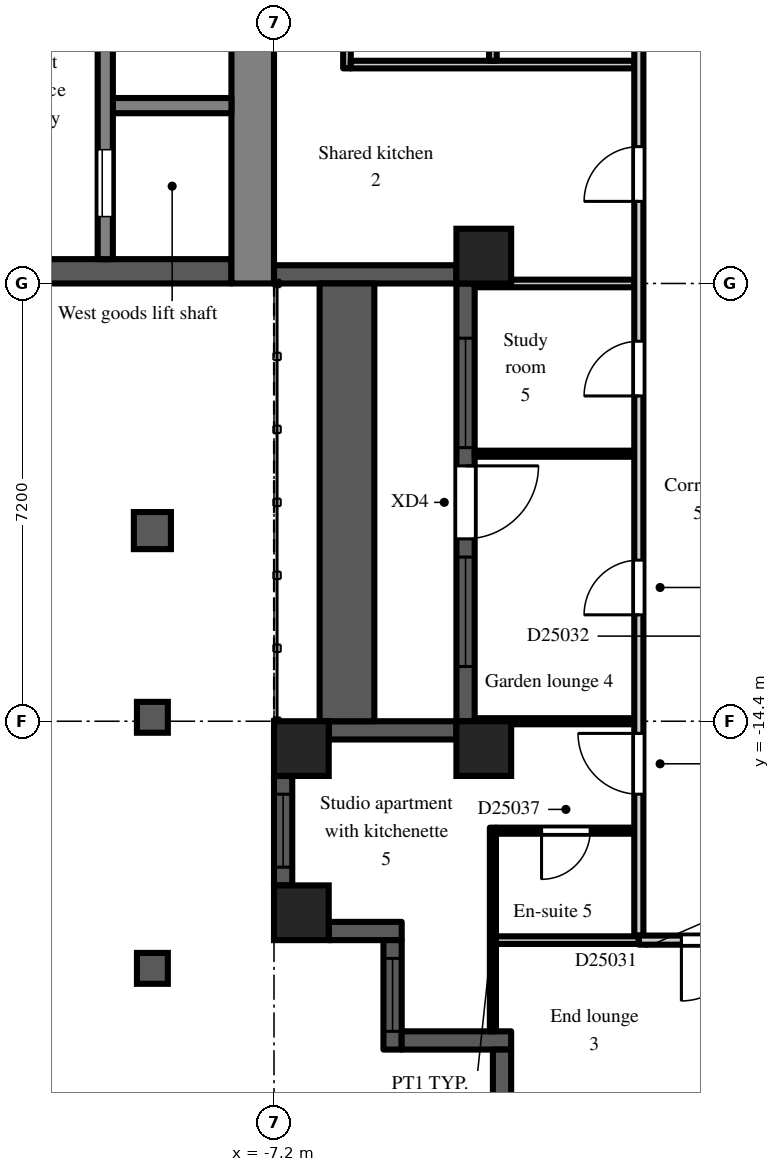
"""IFC4 building model, lengths in metres.
Left out: names, types, materials, properties, quantities, classifications, styles, units other than length and angle.
Written with IfcOpenShell. Run it as: python <this file> out.ifc"""

import sys

from ifc_helpers import new_model, si_unit, direction, frame, frame_2d, origin, origin_2d, place, context, subcontext, project, spatial, rectangle, extrude, element, fill, save


model = new_model("IFC4")
c1 = context("Model", 3, precision=1e-05, world=origin(), true_north=direction((0.0, 1.0)))
c2 = subcontext(c1, "Body", "Model", "MODEL_VIEW")
j1 = project(units=[si_unit("LENGTHUNIT", "METRE"), si_unit("PLANEANGLEUNIT", "RADIAN")], contexts=[c1])
p1 = place(None, origin())
s1 = spatial("IfcSite", under=j1, at=p1, CompositionType="ELEMENT")
p2 = place(p1, origin())
s2 = spatial("IfcBuilding", under=s1, at=p2, CompositionType="ELEMENT")
p3 = place(p2, frame((0.0, 0.0, 170.7)))
s3 = spatial("IfcBuildingStorey", under=s2, at=p3, CompositionType="ELEMENT", Elevation=170.7)
for number, where, z_axis, x_axis in (
    (1, (-6.75, -17.55, 0.0), (0.0, 0.0, 1.0), (1.0, 0.0, 0.0)),
    (2, (-6.75, -14.85, 0.0), (0.0, 0.0, 1.0), (1.0, 0.0, 0.0)),
    (3, (-3.75, -14.85, 0.0), (0.0, 0.0, 1.0), (1.0, 0.0, 0.0)),
    (4, (-3.75, -6.75, 0.0), (0.0, 0.0, 1.0), (1.0, 0.0, 0.0)),
):
    element("IfcColumn", number, at=place(p3, frame(where, z_axis=z_axis, x_axis=x_axis)), inside=s3, PredefinedType="COLUMN", context=c2, shape_type="SweptSolid", body=[
        extrude(rectangle(XDim=0.9, YDim=0.9, at=origin_2d()), origin(), (0.0, 0.0, 1.0), 3.0),
    ])
p4 = place(p3, frame((-7.2, -7.05, 0.0), z_axis=(0.0, 0.0, 1.0), x_axis=(1.0, 0.0, 0.0)))
e5 = element("IfcWall", 5, at=p4, inside=s3, PredefinedType="SOLIDWALL", context=c2, shape_type="SweptSolid", body=[
    extrude(rectangle(XDim=3.0, YDim=0.3, at=frame_2d((1.5, 0.0))), origin(), (0.0, 0.0, 1.0), 2.2),
])
p5 = place(p3, frame((-4.05, -7.2, 0.0), z_axis=(0.0, 0.0, 1.0), x_axis=(0.0, -1.0, 0.0)))
e6 = element("IfcWall", 6, at=p5, inside=s3, PredefinedType="SOLIDWALL", context=c2, shape_type="SweptSolid", body=[
    extrude(rectangle(XDim=7.2, YDim=0.3, at=frame_2d((3.6, 0.0))), origin(), (0.0, 0.0, 1.0), 2.2),
])
p6 = place(p5, frame((3.0, 0.0, 0.0)))
e7 = element("IfcOpeningElement", 7, at=p6, cuts=e6, PredefinedType="OPENING", context=c2, shape_type="SweptSolid", body=[
    extrude(rectangle(XDim=1.2, YDim=2.05, at=frame_2d((0.6, 1.025))), frame((0.0, 0.16, 0.0), z_axis=(0.0, -1.0, 0.0), x_axis=(1.0, 0.0, 0.0)), (0.0, 0.0, 1.0), 0.32),
])
p7 = place(p5, frame((0.9, 0.0, 0.2)))
e8 = element("IfcOpeningElement", 8, at=p7, cuts=e6, PredefinedType="OPENING", context=c2, shape_type="SweptSolid", body=[
    extrude(rectangle(XDim=1.8, YDim=1.85, at=frame_2d((0.9, 0.925))), frame((0.0, 0.16, 0.0), z_axis=(0.0, -1.0, 0.0), x_axis=(1.0, 0.0, 0.0)), (0.0, 0.0, 1.0), 0.32),
])
p8 = place(p5, frame((4.5, 0.0, 0.2)))
e9 = element("IfcOpeningElement", 9, at=p8, cuts=e6, PredefinedType="OPENING", context=c2, shape_type="SweptSolid", body=[
    extrude(rectangle(XDim=1.8, YDim=1.85, at=frame_2d((0.9, 0.925))), frame((0.0, 0.16, 0.0), z_axis=(0.0, -1.0, 0.0), x_axis=(1.0, 0.0, 0.0)), (0.0, 0.0, 1.0), 0.32),
])
p9 = place(p3, frame((-4.2, -14.55, 0.0), z_axis=(0.0, 0.0, 1.0), x_axis=(-1.0, 0.0, 0.0)))
e10 = element("IfcWall", 10, at=p9, inside=s3, PredefinedType="SOLIDWALL", context=c2, shape_type="SweptSolid", body=[
    extrude(rectangle(XDim=2.1, YDim=0.3, at=frame_2d((1.05, 0.0))), origin(), (0.0, 0.0, 1.0), 2.2),
])
p10 = place(p3, frame((-7.05, -15.3, 0.0), z_axis=(0.0, 0.0, 1.0), x_axis=(0.0, -1.0, 0.0)))
e11 = element("IfcWall", 11, at=p10, inside=s3, PredefinedType="SOLIDWALL", context=c2, shape_type="SweptSolid", body=[
    extrude(rectangle(XDim=1.8, YDim=0.3, at=frame_2d((0.9, 0.0))), origin(), (0.0, 0.0, 1.0), 2.2),
])
p11 = place(p10, frame((0.3, 0.0, 0.2)))
e12 = element("IfcOpeningElement", 12, at=p11, cuts=e11, PredefinedType="OPENING", context=c2, shape_type="SweptSolid", body=[
    extrude(rectangle(XDim=1.2, YDim=1.85, at=frame_2d((0.6, 0.925))), frame((0.0, 0.16, 0.0), z_axis=(0.0, -1.0, 0.0), x_axis=(1.0, 0.0, 0.0)), (0.0, 0.0, 1.0), 0.32),
])
p12 = place(p3, frame((-6.3, -17.85, 0.0), z_axis=(0.0, 0.0, 1.0), x_axis=(1.0, 0.0, 0.0)))
e13 = element("IfcWall", 13, at=p12, inside=s3, PredefinedType="SOLIDWALL", context=c2, shape_type="SweptSolid", body=[
    extrude(rectangle(XDim=1.2, YDim=0.3, at=frame_2d((0.6, 0.0))), origin(), (0.0, 0.0, 1.0), 2.6),
])
p13 = place(p3, frame((-5.25, -18.0, 0.0), z_axis=(0.0, 0.0, 1.0), x_axis=(0.0, -1.0, 0.0)))
e14 = element("IfcWall", 14, at=p13, inside=s3, PredefinedType="SOLIDWALL", context=c2, shape_type="SweptSolid", body=[
    extrude(rectangle(XDim=1.8, YDim=0.3, at=frame_2d((0.9, 0.0))), origin(), (0.0, 0.0, 1.0), 2.6),
])
p14 = place(p13, frame((0.3, 0.0, 0.2)))
e15 = element("IfcOpeningElement", 15, at=p14, cuts=e14, PredefinedType="OPENING", context=c2, shape_type="SweptSolid", body=[
    extrude(rectangle(XDim=1.2, YDim=1.85, at=frame_2d((0.6, 0.925))), frame((0.0, 0.16, 0.0), z_axis=(0.0, -1.0, 0.0), x_axis=(1.0, 0.0, 0.0)), (0.0, 0.0, 1.0), 0.32),
])
p15 = place(p3, frame((-5.1, -19.65, 0.0), z_axis=(0.0, 0.0, 1.0), x_axis=(1.0, 0.0, 0.0)))
e16 = element("IfcWall", 16, at=p15, inside=s3, PredefinedType="SOLIDWALL", context=c2, shape_type="SweptSolid", body=[
    extrude(rectangle(XDim=1.8, YDim=0.3, at=frame_2d((0.9, 0.0))), origin(), (0.0, 0.0, 1.0), 2.6),
])
p16 = place(p3, frame((-3.45, -19.8, 0.0), z_axis=(0.0, 0.0, 1.0), x_axis=(0.0, -1.0, 0.0)))
e17 = element("IfcWall", 17, at=p16, inside=s3, PredefinedType="SOLIDWALL", context=c2, shape_type="SweptSolid", body=[
    extrude(rectangle(XDim=0.9, YDim=0.3, at=frame_2d((0.45, 0.0))), origin(), (0.0, 0.0, 1.0), 2.6),
])
p17 = place(p3, frame((-6.0, -14.4, 0.0), z_axis=(0.0, 0.0, 1.0), x_axis=(0.0, 1.0, 0.0)))
e18 = element("IfcWall", 18, at=p17, inside=s3, PredefinedType="PARAPET", context=c2, shape_type="SweptSolid", body=[
    extrude(rectangle(XDim=7.2, YDim=0.9, at=frame_2d((3.6, 0.0))), origin(), (0.0, 0.0, 1.0), 0.8),
])
p18 = place(p3, frame((-7.55, -7.2, 0.0), z_axis=(0.0, 0.0, 1.0), x_axis=(0.0, 1.0, 0.0)))
e19 = element("IfcWall", 19, at=p18, inside=s3, PredefinedType="SHEAR", context=c2, shape_type="SweptSolid", body=[
    extrude(rectangle(XDim=14.4, YDim=0.7, at=frame_2d((7.2, 0.0))), origin(), (0.0, 0.0, 1.0), 2.6),
])
p19 = place(p18, frame((6.0, 0.0, 0.0)))
e20 = element("IfcOpeningElement", 20, at=p19, cuts=e19, PredefinedType="OPENING", context=c2, shape_type="SweptSolid", body=[
    extrude(rectangle(XDim=2.4, YDim=2.2, at=frame_2d((1.2, 1.1))), frame((0.0, 0.36, 0.0), z_axis=(0.0, -1.0, 0.0), x_axis=(1.0, 0.0, 0.0)), (0.0, 0.0, 1.0), 0.72),
])
p20 = place(p3, frame((-7.9, -7.0, 0.0), z_axis=(0.0, 0.0, 1.0), x_axis=(-1.0, 0.0, 0.0)))
e21 = element("IfcWall", 21, at=p20, inside=s3, PredefinedType="SHEAR", context=c2, shape_type="SweptSolid", body=[
    extrude(rectangle(XDim=12.95, YDim=0.4, at=frame_2d((6.475, 0.0))), origin(), (0.0, 0.0, 1.0), 2.6),
])
p21 = place(p3, frame((-7.9, -4.275, 0.0), z_axis=(0.0, 0.0, 1.0), x_axis=(-1.0, 0.0, 0.0)))
e22 = element("IfcWall", 22, at=p21, inside=s3, PredefinedType="SHEAR", context=c2, shape_type="SweptSolid", body=[
    extrude(rectangle(XDim=1.95, YDim=0.25, at=frame_2d((0.975, 0.0))), origin(), (0.0, 0.0, 1.0), 2.6),
])
p22 = place(p3, frame((-9.975, -2.05, 0.0), z_axis=(0.0, 0.0, 1.0), x_axis=(0.0, -1.0, 0.0)))
e23 = element("IfcWall", 23, at=p22, inside=s3, PredefinedType="SHEAR", context=c2, shape_type="SweptSolid", body=[
    extrude(rectangle(XDim=4.75, YDim=0.25, at=frame_2d((2.375, 0.0))), origin(), (0.0, 0.0, 1.0), 2.6),
])
p23 = place(p22, frame((2.95, 0.0, 0.0)))
e24 = element("IfcOpeningElement", 24, at=p23, cuts=e23, PredefinedType="OPENING", context=c2, shape_type="SweptSolid", body=[
    extrude(rectangle(XDim=1.1, YDim=2.1, at=frame_2d((0.55, 1.05))), frame((0.0, 0.135, 0.0), z_axis=(0.0, -1.0, 0.0), x_axis=(1.0, 0.0, 0.0)), (0.0, 0.0, 1.0), 0.27),
])
p24 = place(p3, frame((-6.0, -3.663, 0.0), z_axis=(0.0, 0.0, 1.0), x_axis=(0.0, 1.0, 0.0)))
e25 = element("IfcWall", 25, at=p24, inside=s3, PredefinedType="PARTITIONING", context=c2, shape_type="SweptSolid", body=[
    extrude(rectangle(XDim=2.388, YDim=0.125, at=frame_2d((1.194, 0.0))), origin(), (0.0, 0.0, 1.0), 2.6),
])
p25 = place(p3, frame((-5.938, -3.6, 0.0), z_axis=(0.0, 0.0, 1.0), x_axis=(1.0, 0.0, 0.0)))
e26 = element("IfcWall", 26, at=p25, inside=s3, PredefinedType="PARTITIONING", context=c2, shape_type="SweptSolid", body=[
    extrude(rectangle(XDim=4.663, YDim=0.125, at=frame_2d((2.331, 0.0))), origin(), (0.0, 0.0, 1.0), 2.6),
])
for number, where, z_axis, x_axis in (
    (27, (-3.9, -14.4, 0.0), (0.0, 0.0, 1.0), (1.0, 0.0, 0.0)),
    (28, (-3.9, -10.0, 0.0), (0.0, 0.0, 1.0), (1.0, 0.0, 0.0)),
):
    element("IfcWall", number, at=place(p3, frame(where, z_axis=z_axis, x_axis=x_axis)), inside=s3, PredefinedType="PARTITIONING", context=c2, shape_type="SweptSolid", body=[
        extrude(rectangle(XDim=2.625, YDim=0.1, at=frame_2d((1.312, 0.0))), origin(), (0.0, 0.0, 1.0), 2.6),
    ])
p26 = place(p3, frame((-3.9, -7.2, 0.0), z_axis=(0.0, 0.0, 1.0), x_axis=(1.0, 0.0, 0.0)))
e29 = element("IfcWall", 29, at=p26, inside=s3, PredefinedType="PARTITIONING", context=c2, shape_type="SweptSolid", body=[
    extrude(rectangle(XDim=2.625, YDim=0.125, at=frame_2d((1.312, 0.0))), origin(), (0.0, 0.0, 1.0), 2.6),
])
p27 = place(p3, frame((-3.6, -19.5, 0.0), z_axis=(0.0, 0.0, 1.0), x_axis=(0.0, 1.0, 0.0)))
e30 = element("IfcWall", 30, at=p27, inside=s3, PredefinedType="PARTITIONING", context=c2, shape_type="SweptSolid", body=[
    extrude(rectangle(XDim=3.35, YDim=0.1, at=frame_2d((1.675, 0.0))), origin(), (0.0, 0.0, 1.0), 2.6),
])
p28 = place(p3, frame((-3.55, -18.0, 0.0), z_axis=(0.0, 0.0, 1.0), x_axis=(1.0, 0.0, 0.0)))
e31 = element("IfcWall", 31, at=p28, inside=s3, PredefinedType="PARTITIONING", context=c2, shape_type="SweptSolid", body=[
    extrude(rectangle(XDim=2.35, YDim=0.125, at=frame_2d((1.175, 0.0))), origin(), (0.0, 0.0, 1.0), 2.6),
])
p29 = place(p3, frame((-3.55, -16.2, 0.0), z_axis=(0.0, 0.0, 1.0), x_axis=(1.0, 0.0, 0.0)))
e32 = element("IfcWall", 32, at=p29, inside=s3, PredefinedType="PARTITIONING", context=c2, shape_type="SweptSolid", body=[
    extrude(rectangle(XDim=2.275, YDim=0.1, at=frame_2d((1.138, 0.0))), origin(), (0.0, 0.0, 1.0), 2.6),
])
p30 = place(p29, frame((0.75, 0.0, 0.0)))
e33 = element("IfcOpeningElement", 33, at=p30, cuts=e32, PredefinedType="OPENING", context=c2, shape_type="SweptSolid", body=[
    extrude(rectangle(XDim=0.8, YDim=2.1, at=frame_2d((0.4, 1.05))), frame((0.0, 0.06, 0.0), z_axis=(0.0, -1.0, 0.0), x_axis=(1.0, 0.0, 0.0)), (0.0, 0.0, 1.0), 0.12),
])
p31 = place(p3, frame((-3.6, -3.538, 0.0), z_axis=(0.0, 0.0, 1.0), x_axis=(0.0, 1.0, 0.0)))
e34 = element("IfcWall", 34, at=p31, inside=s3, PredefinedType="PARTITIONING", context=c2, shape_type="SweptSolid", body=[
    extrude(rectangle(XDim=2.263, YDim=0.125, at=frame_2d((1.131, 0.0))), origin(), (0.0, 0.0, 1.0), 2.6),
])
p32 = place(p3, frame((-1.2, -17.925, 0.0), z_axis=(0.0, 0.0, 1.0), x_axis=(0.0, 1.0, 0.0)))
e35 = element("IfcWall", 35, at=p32, inside=s3, PredefinedType="PARTITIONING", context=c2, shape_type="SweptSolid", body=[
    extrude(rectangle(XDim=16.65, YDim=0.15, at=frame_2d((8.325, 0.0))), origin(), (0.0, 0.0, 1.0), 2.6),
])
p33 = place(p32, frame((15.075, 0.0, 0.0)))
e36 = element("IfcOpeningElement", 36, at=p33, cuts=e35, PredefinedType="OPENING", context=c2, shape_type="SweptSolid", body=[
    extrude(rectangle(XDim=0.9, YDim=2.1, at=frame_2d((0.45, 1.05))), frame((0.0, 0.085, 0.0), z_axis=(0.0, -1.0, 0.0), x_axis=(1.0, 0.0, 0.0)), (0.0, 0.0, 1.0), 0.17),
])
p34 = place(p32, frame((12.075, 0.0, 0.0)))
e37 = element("IfcOpeningElement", 37, at=p34, cuts=e35, PredefinedType="OPENING", context=c2, shape_type="SweptSolid", body=[
    extrude(rectangle(XDim=0.9, YDim=2.1, at=frame_2d((0.45, 1.05))), frame((0.0, 0.085, 0.0), z_axis=(0.0, -1.0, 0.0), x_axis=(1.0, 0.0, 0.0)), (0.0, 0.0, 1.0), 0.17),
])
p35 = place(p32, frame((8.875, 0.0, 0.0)))
e38 = element("IfcOpeningElement", 38, at=p35, cuts=e35, PredefinedType="OPENING", context=c2, shape_type="SweptSolid", body=[
    extrude(rectangle(XDim=0.9, YDim=2.1, at=frame_2d((0.45, 1.05))), frame((0.0, 0.085, 0.0), z_axis=(0.0, -1.0, 0.0), x_axis=(1.0, 0.0, 0.0)), (0.0, 0.0, 1.0), 0.17),
])
p36 = place(p32, frame((5.275, 0.0, 0.0)))
e39 = element("IfcOpeningElement", 39, at=p36, cuts=e35, PredefinedType="OPENING", context=c2, shape_type="SweptSolid", body=[
    extrude(rectangle(XDim=0.9, YDim=2.1, at=frame_2d((0.45, 1.05))), frame((0.0, 0.085, 0.0), z_axis=(0.0, -1.0, 0.0), x_axis=(1.0, 0.0, 0.0)), (0.0, 0.0, 1.0), 0.17),
])
p37 = place(p32, frame((2.325, 0.0, 0.0)))
e40 = element("IfcOpeningElement", 40, at=p37, cuts=e35, PredefinedType="OPENING", context=c2, shape_type="SweptSolid", body=[
    extrude(rectangle(XDim=1.0, YDim=2.1, at=frame_2d((0.5, 1.05))), frame((0.0, 0.085, 0.0), z_axis=(0.0, -1.0, 0.0), x_axis=(1.0, 0.0, 0.0)), (0.0, 0.0, 1.0), 0.17),
])
p38 = place(p3, frame((-1.2, -18.0, 0.0), z_axis=(0.0, 0.0, 1.0), x_axis=(1.0, 0.0, 0.0)))
e41 = element("IfcWall", 41, at=p38, inside=s3, PredefinedType="PARTITIONING", context=c2, shape_type="SweptSolid", body=[
    extrude(rectangle(XDim=2.4, YDim=0.15, at=frame_2d((1.2, 0.0))), origin(), (0.0, 0.0, 1.0), 2.6),
])
p39 = place(p38, frame((0.7, 0.0, 0.0)))
e42 = element("IfcOpeningElement", 42, at=p39, cuts=e41, PredefinedType="OPENING", context=c2, shape_type="SweptSolid", body=[
    extrude(rectangle(XDim=1.0, YDim=2.1, at=frame_2d((0.5, 1.05))), frame((0.0, 0.085, 0.0), z_axis=(0.0, -1.0, 0.0), x_axis=(1.0, 0.0, 0.0)), (0.0, 0.0, 1.0), 0.17),
])
p40 = place(p6, origin())
e43 = element("IfcDoor", 43, at=p40, inside=s3, OperationType="SINGLE_SWING_LEFT", PredefinedType="DOOR", context=c2, shape_type="SweptSolid", body=[
    extrude(rectangle(XDim=1.2, YDim=2.05, at=frame_2d((0.6, 1.025))), frame((0.0, 0.025, 0.0), z_axis=(0.0, -1.0, 0.0), x_axis=(1.0, 0.0, 0.0)), (0.0, 0.0, 1.0), 0.05),
])
fill(e7, e43)
p41 = place(p7, origin())
e44 = element("IfcWindow", 44, at=p41, inside=s3, PartitioningType="SINGLE_PANEL", PredefinedType="WINDOW", context=c2, shape_type="SweptSolid", body=[
    extrude(rectangle(XDim=1.8, YDim=1.85, at=frame_2d((0.9, 0.925))), frame((0.0, 0.03, 0.0), z_axis=(0.0, -1.0, 0.0), x_axis=(1.0, 0.0, 0.0)), (0.0, 0.0, 1.0), 0.06),
])
fill(e8, e44)
p42 = place(p8, origin())
e45 = element("IfcWindow", 45, at=p42, inside=s3, PartitioningType="SINGLE_PANEL", PredefinedType="WINDOW", context=c2, shape_type="SweptSolid", body=[
    extrude(rectangle(XDim=1.8, YDim=1.85, at=frame_2d((0.9, 0.925))), frame((0.0, 0.03, 0.0), z_axis=(0.0, -1.0, 0.0), x_axis=(1.0, 0.0, 0.0)), (0.0, 0.0, 1.0), 0.06),
])
fill(e9, e45)
p43 = place(p11, origin())
e46 = element("IfcWindow", 46, at=p43, inside=s3, PartitioningType="SINGLE_PANEL", PredefinedType="WINDOW", context=c2, shape_type="SweptSolid", body=[
    extrude(rectangle(XDim=1.2, YDim=1.85, at=frame_2d((0.6, 0.925))), frame((0.0, 0.03, 0.0), z_axis=(0.0, -1.0, 0.0), x_axis=(1.0, 0.0, 0.0)), (0.0, 0.0, 1.0), 0.06),
])
fill(e12, e46)
p44 = place(p14, origin())
e47 = element("IfcWindow", 47, at=p44, inside=s3, PartitioningType="SINGLE_PANEL", PredefinedType="WINDOW", context=c2, shape_type="SweptSolid", body=[
    extrude(rectangle(XDim=1.2, YDim=1.85, at=frame_2d((0.6, 0.925))), frame((0.0, 0.03, 0.0), z_axis=(0.0, -1.0, 0.0), x_axis=(1.0, 0.0, 0.0)), (0.0, 0.0, 1.0), 0.06),
])
fill(e15, e47)
p45 = place(p23, origin())
e48 = element("IfcDoor", 48, at=p45, inside=s3, OperationType="SLIDING_TO_LEFT", PredefinedType="DOOR", context=c2, shape_type="SweptSolid", body=[
    extrude(rectangle(XDim=1.1, YDim=2.1, at=frame_2d((0.55, 1.05))), frame((0.0, 0.025, 0.0), z_axis=(0.0, -1.0, 0.0), x_axis=(1.0, 0.0, 0.0)), (0.0, 0.0, 1.0), 0.05),
])
fill(e24, e48)
p46 = place(p34, origin())
e49 = element("IfcDoor", 49, at=p46, inside=s3, OperationType="SINGLE_SWING_LEFT", PredefinedType="DOOR", context=c2, shape_type="SweptSolid", body=[
    extrude(rectangle(XDim=0.9, YDim=2.1, at=frame_2d((0.45, 1.05))), frame((0.0, 0.025, 0.0), z_axis=(0.0, -1.0, 0.0), x_axis=(1.0, 0.0, 0.0)), (0.0, 0.0, 1.0), 0.05),
])
fill(e37, e49)
p47 = place(p39, frame((1.0, 0.0, 0.0), z_axis=(0.0, 0.0, 1.0), x_axis=(-1.0, 0.0, 0.0)))
e50 = element("IfcDoor", 50, at=p47, inside=s3, OperationType="SINGLE_SWING_RIGHT", PredefinedType="DOOR", context=c2, shape_type="SweptSolid", body=[
    extrude(rectangle(XDim=1.0, YDim=2.1, at=frame_2d((0.5, 1.05))), frame((0.0, 0.025, 0.0), z_axis=(0.0, -1.0, 0.0), x_axis=(1.0, 0.0, 0.0)), (0.0, 0.0, 1.0), 0.05),
])
fill(e42, e50)
p48 = place(p35, origin())
e51 = element("IfcDoor", 51, at=p48, inside=s3, OperationType="SINGLE_SWING_LEFT", PredefinedType="DOOR", context=c2, shape_type="SweptSolid", body=[
    extrude(rectangle(XDim=0.9, YDim=2.1, at=frame_2d((0.45, 1.05))), frame((0.0, 0.025, 0.0), z_axis=(0.0, -1.0, 0.0), x_axis=(1.0, 0.0, 0.0)), (0.0, 0.0, 1.0), 0.05),
])
fill(e38, e51)
p49 = place(p36, origin())
e52 = element("IfcDoor", 52, at=p49, inside=s3, OperationType="SINGLE_SWING_LEFT", PredefinedType="DOOR", context=c2, shape_type="SweptSolid", body=[
    extrude(rectangle(XDim=0.9, YDim=2.1, at=frame_2d((0.45, 1.05))), frame((0.0, 0.025, 0.0), z_axis=(0.0, -1.0, 0.0), x_axis=(1.0, 0.0, 0.0)), (0.0, 0.0, 1.0), 0.05),
])
fill(e39, e52)
p50 = place(p30, frame((0.8, 0.0, 0.0), z_axis=(0.0, 0.0, 1.0), x_axis=(-1.0, 0.0, 0.0)))
e53 = element("IfcDoor", 53, at=p50, inside=s3, OperationType="SINGLE_SWING_RIGHT", PredefinedType="DOOR", context=c2, shape_type="SweptSolid", body=[
    extrude(rectangle(XDim=0.8, YDim=2.1, at=frame_2d((0.4, 1.05))), frame((0.0, 0.025, 0.0), z_axis=(0.0, -1.0, 0.0), x_axis=(1.0, 0.0, 0.0)), (0.0, 0.0, 1.0), 0.05),
])
fill(e33, e53)
p51 = place(p37, origin())
e54 = element("IfcDoor", 54, at=p51, inside=s3, OperationType="SINGLE_SWING_RIGHT", PredefinedType="DOOR", context=c2, shape_type="SweptSolid", body=[
    extrude(rectangle(XDim=1.0, YDim=2.1, at=frame_2d((0.5, 1.05))), frame((0.0, 0.025, 0.0), z_axis=(0.0, -1.0, 0.0), x_axis=(1.0, 0.0, 0.0)), (0.0, 0.0, 1.0), 0.05),
])
fill(e40, e54)
save(model, sys.argv[1])
